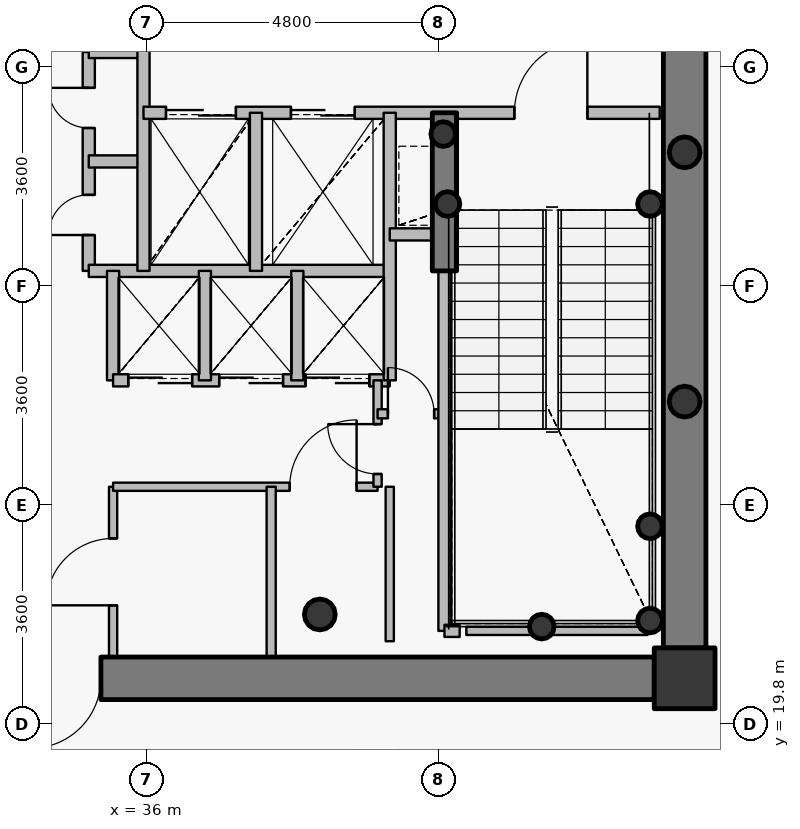
"""IFC4 building model, lengths in metres.
Left out: names, types, materials, properties, quantities, classifications, styles, units other than length and angle.
Written with IfcOpenShell. Run it as: python <this file> out.ifc"""

import sys

from ifc_helpers import new_model, si_unit, direction, frame, frame_2d, origin, origin_2d, place, context, subcontext, project, spatial, rectangle, hollow_circle, extrude, source, transform, mapped, element, fill, save


model = new_model("IFC4")
c1 = context("Model", 3, precision=1e-05, world=origin(), true_north=direction((0.0, 1.0)))
c2 = subcontext(c1, "Body", "Model", "MODEL_VIEW")
j1 = project(units=[si_unit("LENGTHUNIT", "METRE"), si_unit("PLANEANGLEUNIT", "RADIAN")], contexts=[c1])
p1 = place(None, origin())
s1 = spatial("IfcSite", under=j1, at=p1, CompositionType="ELEMENT")
p2 = place(p1, origin())
s2 = spatial("IfcBuilding", under=s1, at=p2, CompositionType="ELEMENT")
p3 = place(p2, frame((0.0, 0.0, 288.0)))
s3 = spatial("IfcBuildingStorey", under=s2, at=p3, CompositionType="ELEMENT", Elevation=288.0)
p4 = place(p3, frame((44.85, 20.55, 0.0), z_axis=(0.0, 0.0, 1.0), x_axis=(1.0, 0.0, 0.0)))
e1 = element("IfcColumn", 1, at=p4, inside=s3, PredefinedType="COLUMN", context=c2, shape_type="SweptSolid", body=[
    extrude(rectangle(XDim=1.0, YDim=1.0, at=origin_2d()), origin(), (0.0, 0.0, 1.0), 3.75),
])
p5 = place(p3, frame((38.85, 21.6, 0.0), z_axis=(0.0, 0.0, 1.0), x_axis=(1.0, 0.0, 0.0)))
e2 = element("IfcColumn", 2, at=p5, inside=s3, PredefinedType="COLUMN", context=c2, shape_type="SweptSolid", body=[
    extrude(hollow_circle(Radius=0.254, WallThickness=0.02, at=origin_2d()), origin(), (0.0, 0.0, 1.0), 3.75),
])
for number, where, z_axis, x_axis in (
    (3, (44.28, 21.5, 0.0), (0.0, 0.0, 1.0), (1.0, 0.0, 0.0)),
    (4, (44.28, 23.05, 0.0), (0.0, 0.0, 1.0), (1.0, 0.0, 0.0)),
    (5, (42.5, 21.4, 0.0), (0.0, 0.0, 1.0), (1.0, 0.0, 0.0)),
    (6, (40.95, 28.35, 0.0), (0.0, 0.0, 1.0), (1.0, 0.0, 0.0)),
    (7, (44.28, 28.35, 0.0), (0.0, 0.0, 1.0), (1.0, 0.0, 0.0)),
    (8, (40.88, 29.5, 0.0), (0.0, 0.0, 1.0), (1.0, 0.0, 0.0)),
):
    element("IfcColumn", number, at=place(p3, frame(where, z_axis=z_axis, x_axis=x_axis)), inside=s3, PredefinedType="COLUMN", context=c2, shape_type="SweptSolid", body=[
        extrude(hollow_circle(Radius=0.203, WallThickness=0.016, at=origin_2d()), origin(), (0.0, 0.0, 1.0), 3.75),
    ])
p6 = place(p3, frame((44.85, 32.95, 0.0), z_axis=(0.0, 0.0, 1.0), x_axis=(0.0, -1.0, 0.0)))
e9 = element("IfcWall", 9, at=p6, inside=s3, PredefinedType="SHEAR", context=c2, shape_type="SweptSolid", body=[
    extrude(rectangle(XDim=11.9, YDim=0.7, at=frame_2d((5.95, 0.0))), origin(), (0.0, 0.0, 1.0), 3.05),
])
p7 = place(p3, frame((44.35, 20.55, 0.0), z_axis=(0.0, 0.0, 1.0), x_axis=(-1.0, 0.0, 0.0)))
e10 = element("IfcWall", 10, at=p7, inside=s3, PredefinedType="SHEAR", context=c2, shape_type="SweptSolid", body=[
    extrude(rectangle(XDim=16.7, YDim=0.7, at=frame_2d((8.35, 0.0))), origin(), (0.0, 0.0, 1.0), 3.05),
])
p8 = place(p7, frame((12.925, 0.0, 0.0)))
e11 = element("IfcOpeningElement", 11, at=p8, cuts=e10, PredefinedType="OPENING", context=c2, shape_type="SweptSolid", body=[
    extrude(rectangle(XDim=1.15, YDim=2.15, at=origin_2d()), frame((0.575, 0.36, 1.075), z_axis=(0.0, -1.0, 0.0), x_axis=(1.0, 0.0, 0.0)), (0.0, 0.0, 1.0), 0.72),
])
p9 = place(p7, frame((9.1, 0.0, 0.0)))
e12 = element("IfcOpeningElement", 12, at=p9, cuts=e10, PredefinedType="OPENING", context=c2, shape_type="SweptSolid", body=[
    extrude(rectangle(XDim=1.15, YDim=2.15, at=origin_2d()), frame((0.575, 0.36, 1.075), z_axis=(0.0, -1.0, 0.0), x_axis=(1.0, 0.0, 0.0)), (0.0, 0.0, 1.0), 0.72),
])
p10 = place(p3, frame((40.9, 27.25, 0.0), z_axis=(0.0, 0.0, 1.0), x_axis=(0.0, 1.0, 0.0)))
e13 = element("IfcWall", 13, at=p10, inside=s3, PredefinedType="SHEAR", context=c2, shape_type="SweptSolid", body=[
    extrude(rectangle(XDim=2.6, YDim=0.4, at=frame_2d((1.3, 0.0))), origin(), (0.0, 0.0, 1.0), 3.1),
])
for number, where, z_axis, x_axis in (
    (14, (44.85, 25.1, 0.0), (0.0, 0.0, 1.0), (1.0, 0.0, 0.0)),
    (15, (44.85, 29.2, 0.0), (0.0, 0.0, 1.0), (1.0, 0.0, 0.0)),
):
    element("IfcColumn", number, at=place(p3, frame(where, z_axis=z_axis, x_axis=x_axis)), inside=s3, PredefinedType="COLUMN", context=c2, shape_type="SweptSolid", body=[
        extrude(hollow_circle(Radius=0.254, WallThickness=0.02, at=origin_2d()), origin(), (0.0, 0.0, 1.0), 3.75),
    ])
p11 = place(p3, frame((35.05, 27.25, 0.0), z_axis=(0.0, 0.0, 1.0), x_axis=(0.0, 1.0, 0.0)))
e16 = element("IfcWall", 16, at=p11, inside=s3, PredefinedType="PARTITIONING", context=c2, shape_type="SweptSolid", body=[
    extrude(rectangle(XDim=3.6, YDim=0.2, at=frame_2d((1.8, 0.0))), origin(), (0.0, 0.0, 1.0), 3.5),
])
p12 = place(p11, frame((0.59, 0.0, 0.0)))
e17 = element("IfcOpeningElement", 17, at=p12, cuts=e16, PredefinedType="OPENING", context=c2, shape_type="SweptSolid", body=[
    extrude(rectangle(XDim=0.66, YDim=2.05, at=origin_2d()), frame((0.33, 0.11, 1.025), z_axis=(0.0, -1.0, 0.0), x_axis=(1.0, 0.0, 0.0)), (0.0, 0.0, 1.0), 0.22),
])
p13 = place(p11, frame((2.35, 0.0, 0.0)))
e18 = element("IfcOpeningElement", 18, at=p13, cuts=e16, PredefinedType="OPENING", context=c2, shape_type="SweptSolid", body=[
    extrude(rectangle(XDim=0.66, YDim=2.05, at=origin_2d()), frame((0.33, 0.11, 1.025), z_axis=(0.0, -1.0, 0.0), x_axis=(1.0, 0.0, 0.0)), (0.0, 0.0, 1.0), 0.22),
])
p14 = place(p3, frame((35.05, 27.25, 0.0), z_axis=(0.0, 0.0, 1.0), x_axis=(1.0, 0.0, 0.0)))
e19 = element("IfcWall", 19, at=p14, inside=s3, PredefinedType="PARTITIONING", context=c2, shape_type="SweptSolid", body=[
    extrude(rectangle(XDim=4.95, YDim=0.2, at=frame_2d((2.475, 0.0))), origin(), (0.0, 0.0, 1.0), 3.085),
])
for number, where, z_axis, x_axis in (
    (20, (35.05, 29.05, 0.0), (0.0, 0.0, 1.0), (1.0, 0.0, 0.0)),
    (21, (35.05, 30.85, 0.0), (0.0, 0.0, 1.0), (1.0, 0.0, 0.0)),
):
    element("IfcWall", number, at=place(p3, frame(where, z_axis=z_axis, x_axis=x_axis)), inside=s3, PredefinedType="PARTITIONING", context=c2, shape_type="SweptSolid", body=[
        extrude(rectangle(XDim=0.9, YDim=0.2, at=frame_2d((0.45, 0.0))), origin(), (0.0, 0.0, 1.0), 3.5),
    ])
p15 = place(p3, frame((35.45, 20.9, 0.0), z_axis=(0.0, 0.0, 1.0), x_axis=(0.0, 1.0, 0.0)))
e22 = element("IfcWall", 22, at=p15, inside=s3, PredefinedType="PARTITIONING", context=c2, shape_type="SweptSolid", body=[
    extrude(rectangle(XDim=2.8, YDim=0.135, at=frame_2d((1.4, 0.0))), origin(), (0.0, 0.0, 1.0), 3.085),
])
p16 = place(p15, frame((0.85, 0.0, 0.0)))
e23 = element("IfcOpeningElement", 23, at=p16, cuts=e22, PredefinedType="OPENING", context=c2, shape_type="SweptSolid", body=[
    extrude(rectangle(XDim=1.1, YDim=2.15, at=origin_2d()), frame((0.55, 0.078, 1.075), z_axis=(0.0, -1.0, 0.0), x_axis=(1.0, 0.0, 0.0)), (0.0, 0.0, 1.0), 0.155),
])
p17 = place(p3, frame((35.45, 23.7, 0.0), z_axis=(0.0, 0.0, 1.0), x_axis=(1.0, 0.0, 0.0)))
e24 = element("IfcWall", 24, at=p17, inside=s3, PredefinedType="PARTITIONING", context=c2, shape_type="SweptSolid", body=[
    extrude(rectangle(XDim=4.35, YDim=0.135, at=frame_2d((2.175, 0.0))), origin(), (0.0, 0.0, 1.0), 3.085),
])
p18 = place(p17, frame((2.905, 0.0, 0.0)))
e25 = element("IfcOpeningElement", 25, at=p18, cuts=e24, PredefinedType="OPENING", context=c2, shape_type="SweptSolid", body=[
    extrude(rectangle(XDim=1.1, YDim=2.15, at=origin_2d()), frame((0.55, 0.078, 1.075), z_axis=(0.0, -1.0, 0.0), x_axis=(1.0, 0.0, 0.0)), (0.0, 0.0, 1.0), 0.155),
])
p19 = place(p3, frame((35.45, 25.45, 0.0), z_axis=(0.0, 0.0, 1.0), x_axis=(0.0, 1.0, 0.0)))
e26 = element("IfcWall", 26, at=p19, inside=s3, PredefinedType="PARTITIONING", context=c2, shape_type="SweptSolid", body=[
    extrude(rectangle(XDim=1.8, YDim=0.2, at=frame_2d((0.9, 0.0))), origin(), (0.0, 0.0, 1.0), 3.5),
])
p20 = place(p3, frame((35.45, 25.45, 0.0), z_axis=(0.0, 0.0, 1.0), x_axis=(1.0, 0.0, 0.0)))
e27 = element("IfcWall", 27, at=p20, inside=s3, PredefinedType="PARTITIONING", context=c2, shape_type="SweptSolid", body=[
    extrude(rectangle(XDim=4.55, YDim=0.2, at=frame_2d((2.275, 0.0))), origin(), (0.0, 0.0, 1.0), 3.085),
])
p21 = place(p20, frame((0.25, 0.0, 0.0)))
e28 = element("IfcOpeningElement", 28, at=p21, cuts=e27, PredefinedType="OPENING", context=c2, shape_type="SweptSolid", body=[
    extrude(rectangle(XDim=1.05, YDim=2.15, at=origin_2d()), frame((0.525, 0.11, 1.075), z_axis=(0.0, -1.0, 0.0), x_axis=(1.0, 0.0, 0.0)), (0.0, 0.0, 1.0), 0.22),
])
p22 = place(p20, frame((1.745, 0.0, 0.0)))
e29 = element("IfcOpeningElement", 29, at=p22, cuts=e27, PredefinedType="OPENING", context=c2, shape_type="SweptSolid", body=[
    extrude(rectangle(XDim=1.05, YDim=2.15, at=origin_2d()), frame((0.525, 0.11, 1.075), z_axis=(0.0, -1.0, 0.0), x_axis=(1.0, 0.0, 0.0)), (0.0, 0.0, 1.0), 0.22),
])
p23 = place(p20, frame((3.165, 0.0, 0.0)))
e30 = element("IfcOpeningElement", 30, at=p23, cuts=e27, PredefinedType="OPENING", context=c2, shape_type="SweptSolid", body=[
    extrude(rectangle(XDim=1.05, YDim=2.15, at=origin_2d()), frame((0.525, 0.11, 1.075), z_axis=(0.0, -1.0, 0.0), x_axis=(1.0, 0.0, 0.0)), (0.0, 0.0, 1.0), 0.22),
])
p24 = place(p3, frame((35.95, 27.25, 0.0), z_axis=(0.0, 0.0, 1.0), x_axis=(0.0, 1.0, 0.0)))
e31 = element("IfcWall", 31, at=p24, inside=s3, PredefinedType="PARTITIONING", context=c2, shape_type="SweptSolid", body=[
    extrude(rectangle(XDim=3.8, YDim=0.2, at=frame_2d((1.9, 0.0))), origin(), (0.0, 0.0, 1.0), 3.5),
])
p25 = place(p3, frame((35.95, 29.85, 0.0), z_axis=(0.0, 0.0, 1.0), x_axis=(1.0, 0.0, 0.0)))
e32 = element("IfcWall", 32, at=p25, inside=s3, PredefinedType="PARTITIONING", context=c2, shape_type="SweptSolid", body=[
    extrude(rectangle(XDim=8.49, YDim=0.2, at=frame_2d((4.245, 0.0))), origin(), (0.0, 0.0, 1.0), 3.085),
])
p26 = place(p25, frame((6.1, 0.0, 0.0)))
e33 = element("IfcOpeningElement", 33, at=p26, cuts=e32, PredefinedType="OPENING", context=c2, shape_type="SweptSolid", body=[
    extrude(rectangle(XDim=1.2, YDim=2.15, at=origin_2d()), frame((0.6, 0.11, 1.075), z_axis=(0.0, -1.0, 0.0), x_axis=(1.0, 0.0, 0.0)), (0.0, 0.0, 1.0), 0.22),
])
p27 = place(p25, frame((0.37, 0.0, 0.0)))
e34 = element("IfcOpeningElement", 34, at=p27, cuts=e32, PredefinedType="OPENING", context=c2, shape_type="SweptSolid", body=[
    extrude(rectangle(XDim=1.15, YDim=2.15, at=origin_2d()), frame((0.575, 0.11, 1.075), z_axis=(0.0, -1.0, 0.0), x_axis=(1.0, 0.0, 0.0)), (0.0, 0.0, 1.0), 0.22),
])
p28 = place(p25, frame((2.425, 0.0, 0.0)))
e35 = element("IfcOpeningElement", 35, at=p28, cuts=e32, PredefinedType="OPENING", context=c2, shape_type="SweptSolid", body=[
    extrude(rectangle(XDim=1.05, YDim=2.15, at=origin_2d()), frame((0.525, 0.11, 1.075), z_axis=(0.0, -1.0, 0.0), x_axis=(1.0, 0.0, 0.0)), (0.0, 0.0, 1.0), 0.22),
])
p29 = place(p3, frame((36.96, 25.45, 0.0), z_axis=(0.0, 0.0, 1.0), x_axis=(0.0, 1.0, 0.0)))
e36 = element("IfcWall", 36, at=p29, inside=s3, PredefinedType="PARTITIONING", context=c2, shape_type="SweptSolid", body=[
    extrude(rectangle(XDim=1.8, YDim=0.2, at=frame_2d((0.9, 0.0))), origin(), (0.0, 0.0, 1.0), 3.5),
])
p30 = place(p3, frame((37.8, 27.25, 0.0), z_axis=(0.0, 0.0, 1.0), x_axis=(0.0, 1.0, 0.0)))
e37 = element("IfcWall", 37, at=p30, inside=s3, PredefinedType="PARTITIONING", context=c2, shape_type="SweptSolid", body=[
    extrude(rectangle(XDim=2.6, YDim=0.2, at=frame_2d((1.3, 0.0))), origin(), (0.0, 0.0, 1.0), 3.5),
])
p31 = place(p3, frame((38.05, 20.38, 0.0), z_axis=(0.0, 0.0, 1.0), x_axis=(0.0, 1.0, 0.0)))
e38 = element("IfcWall", 38, at=p31, inside=s3, PredefinedType="PARTITIONING", context=c2, shape_type="SweptSolid", body=[
    extrude(rectangle(XDim=3.32, YDim=0.15, at=frame_2d((1.66, 0.0))), origin(), (0.0, 0.0, 1.0), 3.035),
])
p32 = place(p3, frame((38.48, 25.45, 0.0), z_axis=(0.0, 0.0, 1.0), x_axis=(0.0, 1.0, 0.0)))
e39 = element("IfcWall", 39, at=p32, inside=s3, PredefinedType="PARTITIONING", context=c2, shape_type="SweptSolid", body=[
    extrude(rectangle(XDim=1.8, YDim=0.2, at=frame_2d((0.9, 0.0))), origin(), (0.0, 0.0, 1.0), 3.5),
])
p33 = place(p3, frame((39.8, 23.7, 0.0), z_axis=(0.0, 0.0, 1.0), x_axis=(0.0, 1.0, 0.0)))
e40 = element("IfcWall", 40, at=p33, inside=s3, PredefinedType="PARTITIONING", context=c2, shape_type="SweptSolid", body=[
    extrude(rectangle(XDim=1.75, YDim=0.135, at=frame_2d((0.875, 0.0))), origin(), (0.0, 0.0, 1.0), 3.5),
])
p34 = place(p33, frame((0.21, 0.0, 0.0)))
e41 = element("IfcOpeningElement", 41, at=p34, cuts=e40, PredefinedType="OPENING", context=c2, shape_type="SweptSolid", body=[
    extrude(rectangle(XDim=0.82, YDim=2.1, at=origin_2d()), frame((0.41, 0.078, 1.05), z_axis=(0.0, -1.0, 0.0), x_axis=(1.0, 0.0, 0.0)), (0.0, 0.0, 1.0), 0.155),
])
p35 = place(p3, frame((39.8, 24.9, 0.0), z_axis=(0.0, 0.0, 1.0), x_axis=(1.0, 0.0, 0.0)))
e42 = element("IfcWall", 42, at=p35, inside=s3, PredefinedType="PARTITIONING", context=c2, shape_type="SweptSolid", body=[
    extrude(rectangle(XDim=1.1, YDim=0.15, at=frame_2d((0.55, 0.0))), origin(), (0.0, 0.0, 1.0), 3.5),
])
p36 = place(p35, frame((0.17, 0.0, 0.0)))
e43 = element("IfcOpeningElement", 43, at=p36, cuts=e42, PredefinedType="OPENING", context=c2, shape_type="SweptSolid", body=[
    extrude(rectangle(XDim=0.76, YDim=2.1, at=origin_2d()), frame((0.38, 0.085, 1.05), z_axis=(0.0, -1.0, 0.0), x_axis=(1.0, 0.0, 0.0)), (0.0, 0.0, 1.0), 0.17),
])
p37 = place(p3, frame((40.0, 25.45, 0.0), z_axis=(0.0, 0.0, 1.0), x_axis=(0.0, 1.0, 0.0)))
e44 = element("IfcWall", 44, at=p37, inside=s3, PredefinedType="PARTITIONING", context=c2, shape_type="SweptSolid", body=[
    extrude(rectangle(XDim=4.4, YDim=0.2, at=frame_2d((2.2, 0.0))), origin(), (0.0, 0.0, 1.0), 3.5),
])
p38 = place(p3, frame((40.0, 27.85, 0.0), z_axis=(0.0, 0.0, 1.0), x_axis=(1.0, 0.0, 0.0)))
e45 = element("IfcWall", 45, at=p38, inside=s3, PredefinedType="PARTITIONING", context=c2, shape_type="SweptSolid", body=[
    extrude(rectangle(XDim=0.9, YDim=0.2, at=frame_2d((0.45, 0.0))), origin(), (0.0, 0.0, 1.0), 3.5),
])
p39 = place(p3, frame((40.9, 21.33, 0.0), z_axis=(0.0, 0.0, 1.0), x_axis=(0.0, 1.0, 0.0)))
e46 = element("IfcWall", 46, at=p39, inside=s3, PredefinedType="PARTITIONING", context=c2, shape_type="SweptSolid", body=[
    extrude(rectangle(XDim=5.91, YDim=0.2, at=frame_2d((2.955, 0.0))), origin(), (0.0, 0.0, 1.0), 3.035),
])
p40 = place(p3, frame((40.9, 21.33, 0.0), z_axis=(0.0, 0.0, 1.0), x_axis=(1.0, 0.0, 0.0)))
e47 = element("IfcWall", 47, at=p40, inside=s3, PredefinedType="PARTITIONING", context=c2, shape_type="SweptSolid", body=[
    extrude(rectangle(XDim=0.25, YDim=0.2, at=frame_2d((0.125, 0.0))), origin(), (0.0, 0.0, 1.0), 3.035),
])
p41 = place(p3, frame((44.24, 21.33, 0.0), z_axis=(0.0, 0.0, 1.0), x_axis=(-1.0, 0.0, 0.0)))
e48 = element("IfcWall", 48, at=p41, inside=s3, PredefinedType="PARTITIONING", context=c2, shape_type="SweptSolid", body=[
    extrude(rectangle(XDim=2.98, YDim=0.135, at=frame_2d((1.49, 0.0))), origin(), (0.0, 0.0, 1.0), 3.035),
])
p42 = place(p3, frame((40.0, 23.7, 0.0), z_axis=(0.0, 0.0, 1.0), x_axis=(0.0, -1.0, 0.0)))
e49 = element("IfcWall", 49, at=p42, inside=s3, PredefinedType="PARTITIONING", context=c2, shape_type="SweptSolid", body=[
    extrude(rectangle(XDim=2.54, YDim=0.135, at=frame_2d((1.27, 0.0))), origin(), (0.0, 0.0, 1.0), 3.035),
])
p43 = place(p3, frame((44.36, 20.2, 0.0), z_axis=(0.0, 0.0, 1.0), x_axis=(1.0, 0.0, 0.0)))
e50 = element("IfcWall", 50, at=p43, inside=s3, PredefinedType="PARTITIONING", context=c2, shape_type="SweptSolid", body=[
    extrude(rectangle(XDim=0.84, YDim=0.135, at=frame_2d((0.42, 0.0))), origin(), (0.0, 0.0, 1.0), 3.035),
])
p44 = place(p3, frame((45.2, 20.508, 0.0), z_axis=(0.0, 0.0, 1.0), x_axis=(0.0, 1.0, 0.0)))
e51 = element("IfcWall", 51, at=p44, inside=s3, PredefinedType="PARTITIONING", context=c2, shape_type="SweptSolid", body=[
    extrude(rectangle(XDim=0.532, YDim=0.135, at=frame_2d((0.266, 0.0))), origin(), (0.0, 0.0, 1.0), 3.5),
])
m1 = source(origin(), c2, "Body", "SweptSolid", [
    extrude(rectangle(XDim=1.15, YDim=2.15, at=origin_2d()), frame((0.575, 0.025, 1.075), z_axis=(0.0, -1.0, 0.0), x_axis=(1.0, 0.0, 0.0)), (0.0, 0.0, 1.0), 0.05),
])
p45 = place(p9, origin())
e52 = element("IfcDoor", 52, at=p45, inside=s3, OperationType="SINGLE_SWING_RIGHT", PredefinedType="DOOR", context=c2, shape_type="MappedRepresentation", body=[
    mapped(m1, transform((0.0, 0.0, 0.0), x_axis=(1.0, 0.0, 0.0), y_axis=(0.0, 1.0, 0.0), z_axis=(0.0, 0.0, 1.0), scale=1.0)),
])
fill(e12, e52)
m2 = source(origin(), c2, "Body", "SweptSolid", [
    extrude(rectangle(XDim=1.2, YDim=2.15, at=origin_2d()), frame((0.6, 0.025, 1.075), z_axis=(0.0, -1.0, 0.0), x_axis=(1.0, 0.0, 0.0)), (0.0, 0.0, 1.0), 0.05),
])
p46 = place(p26, origin())
e53 = element("IfcDoor", 53, at=p46, inside=s3, OperationType="SINGLE_SWING_RIGHT", PredefinedType="DOOR", context=c2, shape_type="MappedRepresentation", body=[
    mapped(m2, transform((0.0, 0.0, 0.0), x_axis=(1.0, 0.0, 0.0), y_axis=(0.0, 1.0, 0.0), z_axis=(0.0, 0.0, 1.0), scale=1.0)),
])
fill(e33, e53)
m3 = source(origin(), c2, "Body", "SweptSolid", [
    extrude(rectangle(XDim=1.15, YDim=2.15, at=origin_2d()), frame((0.575, 0.025, 1.075), z_axis=(0.0, -1.0, 0.0), x_axis=(1.0, 0.0, 0.0)), (0.0, 0.0, 1.0), 0.05),
])
p47 = place(p27, origin())
e54 = element("IfcDoor", 54, at=p47, inside=s3, OperationType="DOUBLE_DOOR_SLIDING", PredefinedType="USERDEFINED", context=c2, shape_type="MappedRepresentation", body=[
    mapped(m3, transform((0.0, 0.0, 0.0), x_axis=(1.0, 0.0, 0.0), y_axis=(0.0, 1.0, 0.0), z_axis=(0.0, 0.0, 1.0), scale=1.0)),
])
fill(e34, e54)
m4 = source(origin(), c2, "Body", "SweptSolid", [
    extrude(rectangle(XDim=1.05, YDim=2.15, at=origin_2d()), frame((0.525, 0.025, 1.075), z_axis=(0.0, -1.0, 0.0), x_axis=(1.0, 0.0, 0.0)), (0.0, 0.0, 1.0), 0.05),
])
p48 = place(p28, origin())
e55 = element("IfcDoor", 55, at=p48, inside=s3, OperationType="DOUBLE_DOOR_SLIDING", PredefinedType="USERDEFINED", context=c2, shape_type="MappedRepresentation", body=[
    mapped(m4, transform((0.0, 0.0, 0.0), x_axis=(1.0, 0.0, 0.0), y_axis=(0.0, 1.0, 0.0), z_axis=(0.0, 0.0, 1.0), scale=1.0)),
])
fill(e35, e55)
p49 = place(p21, origin())
e56 = element("IfcDoor", 56, at=p49, inside=s3, OperationType="DOUBLE_DOOR_SLIDING", PredefinedType="USERDEFINED", context=c2, shape_type="MappedRepresentation", body=[
    mapped(m4, transform((0.0, 0.0, 0.0), x_axis=(1.0, 0.0, 0.0), y_axis=(0.0, 1.0, 0.0), z_axis=(0.0, 0.0, 1.0), scale=1.0)),
])
fill(e28, e56)
p50 = place(p22, origin())
e57 = element("IfcDoor", 57, at=p50, inside=s3, OperationType="DOUBLE_DOOR_SLIDING", PredefinedType="USERDEFINED", context=c2, shape_type="MappedRepresentation", body=[
    mapped(m4, transform((0.0, 0.0, 0.0), x_axis=(1.0, 0.0, 0.0), y_axis=(0.0, 1.0, 0.0), z_axis=(0.0, 0.0, 1.0), scale=1.0)),
])
fill(e29, e57)
p51 = place(p23, origin())
e58 = element("IfcDoor", 58, at=p51, inside=s3, OperationType="DOUBLE_DOOR_SLIDING", PredefinedType="USERDEFINED", context=c2, shape_type="MappedRepresentation", body=[
    mapped(m4, transform((0.0, 0.0, 0.0), x_axis=(1.0, 0.0, 0.0), y_axis=(0.0, 1.0, 0.0), z_axis=(0.0, 0.0, 1.0), scale=1.0)),
])
fill(e30, e58)
m5 = source(origin(), c2, "Body", "SweptSolid", [
    extrude(rectangle(XDim=0.66, YDim=2.05, at=origin_2d()), frame((0.33, 0.025, 1.025), z_axis=(0.0, -1.0, 0.0), x_axis=(1.0, 0.0, 0.0)), (0.0, 0.0, 1.0), 0.05),
])
p52 = place(p12, origin())
e59 = element("IfcDoor", 59, at=p52, inside=s3, OperationType="SINGLE_SWING_LEFT", PredefinedType="USERDEFINED", context=c2, shape_type="MappedRepresentation", body=[
    mapped(m5, transform((0.0, 0.0, 0.0), x_axis=(1.0, 0.0, 0.0), y_axis=(0.0, 1.0, 0.0), z_axis=(0.0, 0.0, 1.0), scale=1.0)),
])
fill(e17, e59)
p53 = place(p13, origin())
e60 = element("IfcDoor", 60, at=p53, inside=s3, OperationType="SINGLE_SWING_RIGHT", PredefinedType="USERDEFINED", context=c2, shape_type="MappedRepresentation", body=[
    mapped(m5, transform((0.0, 0.0, 0.0), x_axis=(1.0, 0.0, 0.0), y_axis=(0.0, 1.0, 0.0), z_axis=(0.0, 0.0, 1.0), scale=1.0)),
])
fill(e18, e60)
m6 = source(origin(), c2, "Body", "SweptSolid", [
    extrude(rectangle(XDim=1.1, YDim=2.15, at=origin_2d()), frame((0.55, 0.025, 1.075), z_axis=(0.0, -1.0, 0.0), x_axis=(1.0, 0.0, 0.0)), (0.0, 0.0, 1.0), 0.05),
])
p54 = place(p16, origin())
e61 = element("IfcDoor", 61, at=p54, inside=s3, OperationType="SINGLE_SWING_LEFT", PredefinedType="DOOR", context=c2, shape_type="MappedRepresentation", body=[
    mapped(m6, transform((0.0, 0.0, 0.0), x_axis=(1.0, 0.0, 0.0), y_axis=(0.0, 1.0, 0.0), z_axis=(0.0, 0.0, 1.0), scale=1.0)),
])
fill(e23, e61)
p55 = place(p18, origin())
e62 = element("IfcDoor", 62, at=p55, inside=s3, OperationType="SINGLE_SWING_RIGHT", PredefinedType="DOOR", context=c2, shape_type="MappedRepresentation", body=[
    mapped(m6, transform((0.0, 0.0, 0.0), x_axis=(1.0, 0.0, 0.0), y_axis=(0.0, 1.0, 0.0), z_axis=(0.0, 0.0, 1.0), scale=1.0)),
])
fill(e25, e62)
m7 = source(origin(), c2, "Body", "SweptSolid", [
    extrude(rectangle(XDim=0.82, YDim=2.1, at=origin_2d()), frame((0.41, 0.025, 1.05), z_axis=(0.0, -1.0, 0.0), x_axis=(1.0, 0.0, 0.0)), (0.0, 0.0, 1.0), 0.05),
])
p56 = place(p34, origin())
e63 = element("IfcDoor", 63, at=p56, inside=s3, OperationType="SINGLE_SWING_RIGHT", PredefinedType="DOOR", context=c2, shape_type="MappedRepresentation", body=[
    mapped(m7, transform((0.0, 0.0, 0.0), x_axis=(1.0, 0.0, 0.0), y_axis=(0.0, 1.0, 0.0), z_axis=(0.0, 0.0, 1.0), scale=1.0)),
])
fill(e41, e63)
m8 = source(origin(), c2, "Body", "SweptSolid", [
    extrude(rectangle(XDim=0.76, YDim=2.1, at=origin_2d()), frame((0.38, 0.025, 1.05), z_axis=(0.0, -1.0, 0.0), x_axis=(1.0, 0.0, 0.0)), (0.0, 0.0, 1.0), 0.05),
])
p57 = place(p36, origin())
e64 = element("IfcDoor", 64, at=p57, inside=s3, OperationType="SINGLE_SWING_LEFT", PredefinedType="DOOR", context=c2, shape_type="MappedRepresentation", body=[
    mapped(m8, transform((0.0, 0.0, 0.0), x_axis=(1.0, 0.0, 0.0), y_axis=(0.0, 1.0, 0.0), z_axis=(0.0, 0.0, 1.0), scale=1.0)),
])
fill(e43, e64)
save(model, sys.argv[1])
